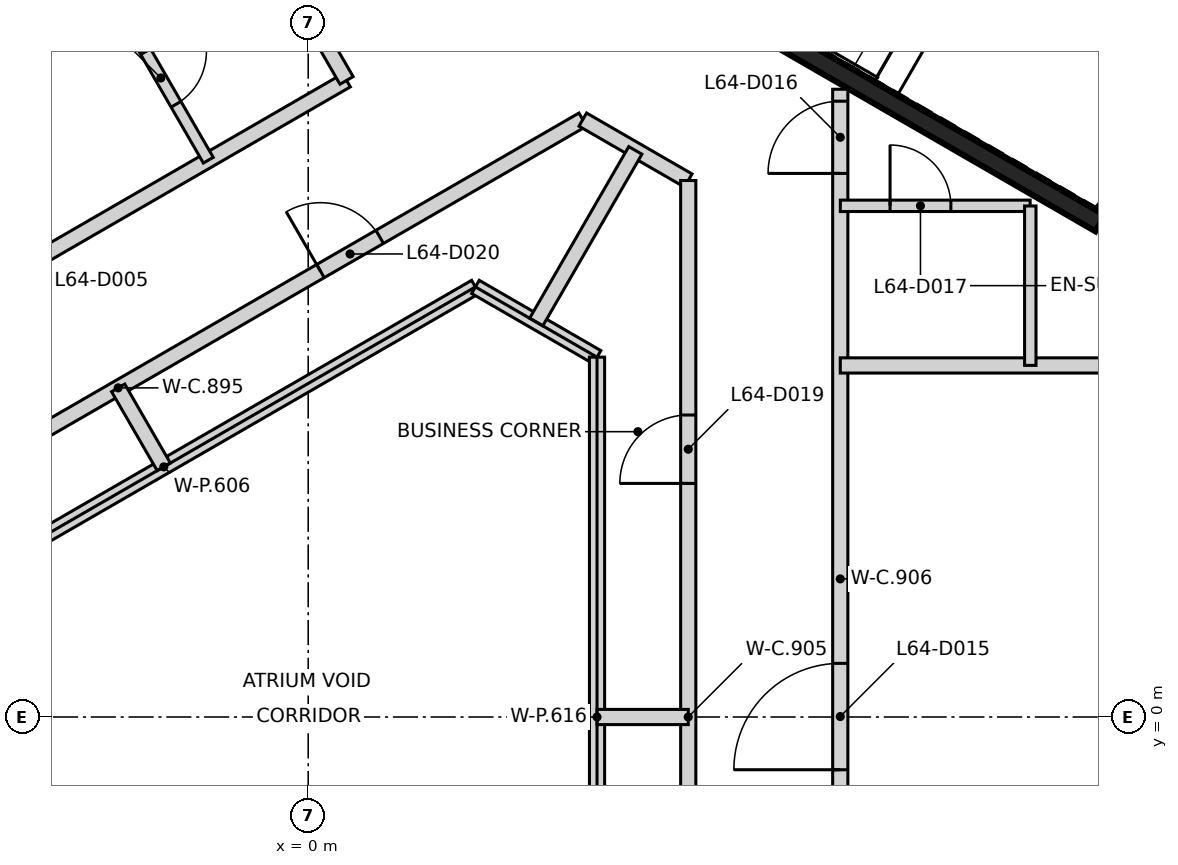
"""IFC4 building model, lengths in metres.
Left out: names, types, materials, properties, quantities, classifications, styles, units other than length and angle.
Written with IfcOpenShell. Run it as: python <this file> out.ifc"""

import sys

from ifc_helpers import new_model, si_unit, direction, frame, frame_2d, origin, place, context, subcontext, project, spatial, rectangle, extrude, element, fill, save


model = new_model("IFC4")
c1 = context("Model", 3, precision=1e-05, world=origin(), true_north=direction((0.0, 1.0)))
c2 = subcontext(c1, "Body", "Model", "MODEL_VIEW")
j1 = project(units=[si_unit("LENGTHUNIT", "METRE"), si_unit("PLANEANGLEUNIT", "RADIAN")], contexts=[c1])
p1 = place(None, origin())
s1 = spatial("IfcSite", under=j1, at=p1, CompositionType="ELEMENT")
p2 = place(p1, origin())
s2 = spatial("IfcBuilding", under=s1, at=p2, CompositionType="ELEMENT")
p3 = place(p2, frame((0.0, 0.0, 253.8)))
s3 = spatial("IfcBuildingStorey", under=s2, at=p3, CompositionType="ELEMENT", Elevation=253.8)
p4 = place(p3, frame((10.42, 6.498, 0.0), z_axis=(0.0, 0.0, 1.0), x_axis=(-0.866021906294, 0.500006057782, 0.0)))
e1 = element("IfcWall", 1, at=p4, inside=s3, PredefinedType="SHEAR", context=c2, shape_type="SweptSolid", body=[
    extrude(rectangle(XDim=11.55, YDim=0.25, at=frame_2d((5.775, 0.0))), origin(), (0.0, 0.0, 1.0), 3.2),
])
p5 = place(p4, frame((10.025, 0.0, 0.0)))
e2 = element("IfcOpeningElement", 2, at=p5, cuts=e1, PredefinedType="OPENING", context=c2, shape_type="SweptSolid", body=[
    extrude(rectangle(XDim=1.2, YDim=2.1, at=frame_2d((0.6, 1.05))), frame((0.0, 0.135, 0.0), z_axis=(0.0, -1.0, 0.0), x_axis=(1.0, 0.0, 0.0)), (0.0, 0.0, 1.0), 0.27),
])
p6 = place(p4, frame((8.725, 0.0, 0.0)))
e3 = element("IfcOpeningElement", 3, at=p6, cuts=e1, PredefinedType="OPENING", context=c2, shape_type="SweptSolid", body=[
    extrude(rectangle(XDim=1.2, YDim=2.1, at=frame_2d((0.6, 1.05))), frame((0.0, 0.135, 0.0), z_axis=(0.0, -1.0, 0.0), x_axis=(1.0, 0.0, 0.0)), (0.0, 0.0, 1.0), 0.27),
])
p7 = place(p3, frame((13.238, 11.378, 0.0), z_axis=(0.0, 0.0, 1.0), x_axis=(-0.500008851346, -0.866020293397, 0.0)))
e4 = element("IfcWall", 4, at=p7, inside=s3, PredefinedType="SHEAR", context=c2, shape_type="SweptSolid", body=[
    extrude(rectangle(XDim=5.51, YDim=0.25, at=frame_2d((2.755, 0.0))), origin(), (0.0, 0.0, 1.0), 3.2),
])
p8 = place(p3, frame((-10.652, 1.928, 0.0), z_axis=(0.0, 0.0, 1.0), x_axis=(0.865793573301, 0.500401327367, 0.0)))
e5 = element("IfcWall", 5, at=p8, inside=s3, PredefinedType="PARTITIONING", context=c2, shape_type="SweptSolid", body=[
    extrude(rectangle(XDim=12.886, YDim=0.2, at=frame_2d((6.443, 0.0))), origin(), (0.0, 0.0, 1.0), 3.2),
])
p9 = place(p8, frame((7.123, 0.0, 0.0)))
e6 = element("IfcOpeningElement", 6, at=p9, cuts=e5, PredefinedType="OPENING", context=c2, shape_type="SweptSolid", body=[
    extrude(rectangle(XDim=0.95, YDim=2.1, at=frame_2d((0.475, 1.05))), frame((0.0, 0.11, 0.0), z_axis=(0.0, -1.0, 0.0), x_axis=(1.0, 0.0, 0.0)), (0.0, 0.0, 1.0), 0.22),
])
p10 = place(p8, frame((0.16, 0.0, 0.0)))
e7 = element("IfcOpeningElement", 7, at=p10, cuts=e5, PredefinedType="OPENING", context=c2, shape_type="SweptSolid", body=[
    extrude(rectangle(XDim=0.95, YDim=2.1, at=frame_2d((0.475, 1.05))), frame((0.0, 0.11, 0.0), z_axis=(0.0, -1.0, 0.0), x_axis=(1.0, 0.0, 0.0)), (0.0, 0.0, 1.0), 0.22),
])
p11 = place(p3, frame((-8.612, -0.801, 0.0), z_axis=(0.0, 0.0, 1.0), x_axis=(0.865998070783, -0.50004733916, 0.0)))
e8 = element("IfcWall", 8, at=p11, inside=s3, PredefinedType="PARTITIONING", context=c2, shape_type="SweptSolid", body=[
    extrude(rectangle(XDim=14.115, YDim=0.2, at=frame_2d((7.058, 0.0))), origin(), (0.0, 0.0, 1.0), 3.2),
])
p12 = place(p11, frame((3.085, 0.0, 0.0)))
e9 = element("IfcOpeningElement", 9, at=p12, cuts=e8, PredefinedType="OPENING", context=c2, shape_type="SweptSolid", body=[
    extrude(rectangle(XDim=0.9, YDim=2.1, at=frame_2d((0.45, 1.05))), frame((0.0, 0.11, 0.0), z_axis=(0.0, -1.0, 0.0), x_axis=(1.0, 0.0, 0.0)), (0.0, 0.0, 1.0), 0.22),
])
p13 = place(p11, frame((10.131, 0.0, 0.0)))
e10 = element("IfcOpeningElement", 10, at=p13, cuts=e8, PredefinedType="OPENING", context=c2, shape_type="SweptSolid", body=[
    extrude(rectangle(XDim=0.9, YDim=2.1, at=frame_2d((0.45, 1.05))), frame((0.0, 0.11, 0.0), z_axis=(0.0, -1.0, 0.0), x_axis=(1.0, 0.0, 0.0)), (0.0, 0.0, 1.0), 0.22),
])
p14 = place(p3, frame((-8.612, 0.801, 0.0), z_axis=(0.0, 0.0, 1.0), x_axis=(0.866005560651, 0.500034367741, 0.0)))
e11 = element("IfcWall", 11, at=p14, inside=s3, PredefinedType="PARTITIONING", context=c2, shape_type="SweptSolid", body=[
    extrude(rectangle(XDim=14.115, YDim=0.2, at=frame_2d((7.058, 0.0))), origin(), (0.0, 0.0, 1.0), 3.2),
])
p15 = place(p14, frame((10.131, 0.0, 0.0)))
e12 = element("IfcOpeningElement", 12, at=p15, cuts=e11, PredefinedType="OPENING", context=c2, shape_type="SweptSolid", body=[
    extrude(rectangle(XDim=0.9, YDim=2.1, at=frame_2d((0.45, 1.05))), frame((0.0, 0.11, 0.0), z_axis=(0.0, -1.0, 0.0), x_axis=(1.0, 0.0, 0.0)), (0.0, 0.0, 1.0), 0.22),
])
p16 = place(p14, frame((3.085, 0.0, 0.0)))
e13 = element("IfcOpeningElement", 13, at=p16, cuts=e11, PredefinedType="OPENING", context=c2, shape_type="SweptSolid", body=[
    extrude(rectangle(XDim=0.9, YDim=2.1, at=frame_2d((0.45, 1.05))), frame((0.0, 0.11, 0.0), z_axis=(0.0, -1.0, 0.0), x_axis=(1.0, 0.0, 0.0)), (0.0, 0.0, 1.0), 0.22),
])
p17 = place(p3, frame((-2.483, 13.551, 0.0), z_axis=(0.0, 0.0, 1.0), x_axis=(0.499878046143, -0.866095802429, 0.0)))
e14 = element("IfcWall", 14, at=p17, inside=s3, PredefinedType="PARTITIONING", context=c2, shape_type="SweptSolid", body=[
    extrude(rectangle(XDim=5.977, YDim=0.2, at=frame_2d((2.988, 0.0))), origin(), (0.0, 0.0, 1.0), 3.2),
])
p18 = place(p17, frame((2.327, 0.0, 0.0)))
e15 = element("IfcOpeningElement", 15, at=p18, cuts=e14, PredefinedType="OPENING", context=c2, shape_type="SweptSolid", body=[
    extrude(rectangle(XDim=0.95, YDim=2.1, at=frame_2d((0.475, 1.05))), frame((0.0, 0.11, 0.0), z_axis=(0.0, -1.0, 0.0), x_axis=(1.0, 0.0, 0.0)), (0.0, 0.0, 1.0), 0.22),
])
p19 = place(p3, frame((3.612, 7.859, 0.0), z_axis=(0.0, 0.0, 1.0), x_axis=(0.866002901518, -0.500038973044, 0.0)))
e16 = element("IfcWall", 16, at=p19, inside=s3, PredefinedType="PARTITIONING", context=c2, shape_type="SweptSolid", body=[
    extrude(rectangle(XDim=1.602, YDim=0.2, at=frame_2d((0.801, 0.0))), origin(), (0.0, 0.0, 1.0), 3.2),
])
p20 = place(p3, frame((5.0, -7.058, 0.0), z_axis=(0.0, 0.0, 1.0), x_axis=(0.0, 1.0, 0.0)))
e17 = element("IfcWall", 17, at=p20, inside=s3, PredefinedType="PARTITIONING", context=c2, shape_type="SweptSolid", body=[
    extrude(rectangle(XDim=14.116, YDim=0.2, at=frame_2d((7.058, 0.0))), origin(), (0.0, 0.0, 1.0), 3.2),
])
p21 = place(p20, frame((3.085, 0.0, 0.0)))
e18 = element("IfcOpeningElement", 18, at=p21, cuts=e17, PredefinedType="OPENING", context=c2, shape_type="SweptSolid", body=[
    extrude(rectangle(XDim=0.9, YDim=2.1, at=frame_2d((0.45, 1.05))), frame((0.0, 0.11, 0.0), z_axis=(0.0, -1.0, 0.0), x_axis=(1.0, 0.0, 0.0)), (0.0, 0.0, 1.0), 0.22),
])
p22 = place(p20, frame((10.131, 0.0, 0.0)))
e19 = element("IfcOpeningElement", 19, at=p22, cuts=e17, PredefinedType="OPENING", context=c2, shape_type="SweptSolid", body=[
    extrude(rectangle(XDim=0.9, YDim=2.1, at=frame_2d((0.45, 1.05))), frame((0.0, 0.11, 0.0), z_axis=(0.0, -1.0, 0.0), x_axis=(1.0, 0.0, 0.0)), (0.0, 0.0, 1.0), 0.22),
])
p23 = place(p3, frame((7.0, -4.625, 0.0), z_axis=(0.0, 0.0, 1.0), x_axis=(0.0, 1.0, 0.0)))
e20 = element("IfcWall", 20, at=p23, inside=s3, PredefinedType="PARTITIONING", context=c2, shape_type="SweptSolid", body=[
    extrude(rectangle(XDim=12.884, YDim=0.2, at=frame_2d((6.442, 0.0))), origin(), (0.0, 0.0, 1.0), 3.2),
])
p24 = place(p23, frame((3.931, 0.0, 0.0)))
e21 = element("IfcOpeningElement", 21, at=p24, cuts=e20, PredefinedType="OPENING", context=c2, shape_type="SweptSolid", body=[
    extrude(rectangle(XDim=1.4, YDim=2.1, at=frame_2d((0.7, 1.05))), frame((0.0, 0.11, 0.0), z_axis=(0.0, -1.0, 0.0), x_axis=(1.0, 0.0, 0.0)), (0.0, 0.0, 1.0), 0.22),
])
p25 = place(p23, frame((11.777, 0.0, 0.0)))
e22 = element("IfcOpeningElement", 22, at=p25, cuts=e20, PredefinedType="OPENING", context=c2, shape_type="SweptSolid", body=[
    extrude(rectangle(XDim=0.95, YDim=2.1, at=frame_2d((0.475, 1.05))), frame((0.0, 0.11, 0.0), z_axis=(0.0, -1.0, 0.0), x_axis=(1.0, 0.0, 0.0)), (0.0, 0.0, 1.0), 0.22),
])
for number, where, z_axis, x_axis in (
    (23, (-6.0, -0.924, 0.0), (0.0, 0.0, 1.0), (0.866, -0.5, 0.0)),
    (24, (-6.0, 0.924, 0.0), (0.0, 0.0, 1.0), (0.866, 0.5, 0.0)),
):
    element("IfcWall", number, at=place(p3, frame(where, z_axis=z_axis, x_axis=x_axis)), inside=s3, PredefinedType="PARTITIONING", context=c2, shape_type="SweptSolid", body=[
        extrude(rectangle(XDim=9.468, YDim=0.2, at=frame_2d((4.734, 0.0))), origin(), (0.0, 0.0, 1.0), 3.2),
    ])
p26 = place(p3, frame((-2.5, 4.33, 0.0), z_axis=(0.0, 0.0, 1.0), x_axis=(0.499969057507, -0.866043267704, 0.0)))
e25 = element("IfcWall", 25, at=p26, inside=s3, PredefinedType="PARTITIONING", context=c2, shape_type="SweptSolid", body=[
    extrude(rectangle(XDim=1.2, YDim=0.2, at=frame_2d((0.6, 0.0))), origin(), (0.0, 0.0, 1.0), 3.2),
])
p27 = place(p3, frame((2.2, 5.658, 0.0), z_axis=(0.0, 0.0, 1.0), x_axis=(0.865818011038, -0.500359042851, 0.0)))
e26 = element("IfcWall", 26, at=p27, inside=s3, PredefinedType="PARTITIONING", context=c2, shape_type="SweptSolid", body=[
    extrude(rectangle(XDim=1.848, YDim=0.2, at=frame_2d((0.924, 0.0))), origin(), (0.0, 0.0, 1.0), 3.2),
])
p28 = place(p3, frame((3.0, 5.196, 0.0), z_axis=(0.0, 0.0, 1.0), x_axis=(0.500076354988, 0.865981315724, 0.0)))
e27 = element("IfcWall", 27, at=p28, inside=s3, PredefinedType="PARTITIONING", context=c2, shape_type="SweptSolid", body=[
    extrude(rectangle(XDim=2.607, YDim=0.2, at=frame_2d((1.304, 0.0))), origin(), (0.0, 0.0, 1.0), 3.2),
])
p29 = place(p3, frame((3.8, -4.734, 0.0), z_axis=(0.0, 0.0, 1.0), x_axis=(0.0, 1.0, 0.0)))
e28 = element("IfcWall", 28, at=p29, inside=s3, PredefinedType="PARTITIONING", context=c2, shape_type="SweptSolid", body=[
    extrude(rectangle(XDim=9.468, YDim=0.2, at=frame_2d((4.734, 0.0))), origin(), (0.0, 0.0, 1.0), 3.2),
])
p30 = place(p3, frame((3.8, 0.0, 0.0), z_axis=(0.0, 0.0, 1.0), x_axis=(1.0, 0.0, 0.0)))
e29 = element("IfcWall", 29, at=p30, inside=s3, PredefinedType="PARTITIONING", context=c2, shape_type="SweptSolid", body=[
    extrude(rectangle(XDim=1.2, YDim=0.2, at=frame_2d((0.6, 0.0))), origin(), (0.0, 0.0, 1.0), 3.2),
])
p31 = place(p3, frame((7.0, 4.625, 0.0), z_axis=(0.0, 0.0, 1.0), x_axis=(1.0, 0.0, 0.0)))
e30 = element("IfcWall", 30, at=p31, inside=s3, PredefinedType="PARTITIONING", context=c2, shape_type="SweptSolid", body=[
    extrude(rectangle(XDim=11.204, YDim=0.2, at=frame_2d((5.602, 0.0))), origin(), (0.0, 0.0, 1.0), 3.2),
])
p32 = place(p3, frame((-2.564, 9.49, 0.0), z_axis=(0.0, 0.0, 1.0), x_axis=(0.500004234368, -0.866022959057, 0.0)))
e31 = element("IfcWall", 31, at=p32, inside=s3, PredefinedType="PARTITIONING", context=c2, shape_type="SweptSolid", body=[
    extrude(rectangle(XDim=2.5, YDim=0.15, at=frame_2d((1.25, 0.0))), origin(), (0.0, 0.0, 1.0), 3.2),
])
p33 = place(p32, frame((0.85, 0.0, 0.0)))
e32 = element("IfcOpeningElement", 32, at=p33, cuts=e31, PredefinedType="OPENING", context=c2, shape_type="SweptSolid", body=[
    extrude(rectangle(XDim=0.8, YDim=2.1, at=frame_2d((0.4, 1.05))), frame((0.0, 0.085, 0.0), z_axis=(0.0, -1.0, 0.0), x_axis=(1.0, 0.0, 0.0)), (0.0, 0.0, 1.0), 0.17),
])
p34 = place(p3, frame((7.001, 6.725, 0.0), z_axis=(0.0, 0.0, 1.0), x_axis=(1.0, 0.0, 0.0)))
e33 = element("IfcWall", 33, at=p34, inside=s3, PredefinedType="PARTITIONING", context=c2, shape_type="SweptSolid", body=[
    extrude(rectangle(XDim=2.497, YDim=0.15, at=frame_2d((1.249, 0.0))), origin(), (0.0, 0.0, 1.0), 3.2),
])
p35 = place(p34, frame((0.654, 0.0, 0.0)))
e34 = element("IfcOpeningElement", 34, at=p35, cuts=e33, PredefinedType="OPENING", context=c2, shape_type="SweptSolid", body=[
    extrude(rectangle(XDim=0.8, YDim=2.1, at=frame_2d((0.4, 1.05))), frame((0.0, 0.085, 0.0), z_axis=(0.0, -1.0, 0.0), x_axis=(1.0, 0.0, 0.0)), (0.0, 0.0, 1.0), 0.17),
])
p36 = place(p3, frame((9.5, 4.626, 0.0), z_axis=(0.0, 0.0, 1.0), x_axis=(0.0, 1.0, 0.0)))
e35 = element("IfcWall", 35, at=p36, inside=s3, PredefinedType="PARTITIONING", context=c2, shape_type="SweptSolid", body=[
    extrude(rectangle(XDim=2.097, YDim=0.15, at=frame_2d((1.048, 0.0))), origin(), (0.0, 0.0, 1.0), 3.2),
])
p37 = place(p33, frame((0.8, 0.0, 0.0), z_axis=(0.0, 0.0, 1.0), x_axis=(-1.0, 0.0, 0.0)))
e36 = element("IfcDoor", 36, at=p37, inside=s3, OperationType="SINGLE_SWING_LEFT", PredefinedType="DOOR", context=c2, shape_type="SweptSolid", body=[
    extrude(rectangle(XDim=0.8, YDim=2.1, at=frame_2d((0.4, 1.05))), frame((0.0, 0.025, 0.0), z_axis=(0.0, -1.0, 0.0), x_axis=(1.0, 0.0, 0.0)), (0.0, 0.0, 1.0), 0.05),
])
fill(e32, e36)
p38 = place(p24, frame((1.4, 0.0, 0.0), z_axis=(0.0, 0.0, 1.0), x_axis=(-1.0, 0.0, 0.0)))
e37 = element("IfcDoor", 37, at=p38, inside=s3, OperationType="DOUBLE_DOOR_SINGLE_SWING", PredefinedType="DOOR", context=c2, shape_type="SweptSolid", body=[
    extrude(rectangle(XDim=1.4, YDim=2.1, at=frame_2d((0.7, 1.05))), frame((0.0, 0.025, 0.0), z_axis=(0.0, -1.0, 0.0), x_axis=(1.0, 0.0, 0.0)), (0.0, 0.0, 1.0), 0.05),
])
fill(e21, e37)
p39 = place(p25, frame((0.95, 0.0, 0.0), z_axis=(0.0, 0.0, 1.0), x_axis=(-1.0, 0.0, 0.0)))
e38 = element("IfcDoor", 38, at=p39, inside=s3, OperationType="SINGLE_SWING_LEFT", PredefinedType="DOOR", context=c2, shape_type="SweptSolid", body=[
    extrude(rectangle(XDim=0.95, YDim=2.1, at=frame_2d((0.475, 1.05))), frame((0.0, 0.025, 0.0), z_axis=(0.0, -1.0, 0.0), x_axis=(1.0, 0.0, 0.0)), (0.0, 0.0, 1.0), 0.05),
])
fill(e22, e38)
p40 = place(p35, origin())
e39 = element("IfcDoor", 39, at=p40, inside=s3, OperationType="SINGLE_SWING_LEFT", PredefinedType="DOOR", context=c2, shape_type="SweptSolid", body=[
    extrude(rectangle(XDim=0.8, YDim=2.1, at=frame_2d((0.4, 1.05))), frame((0.0, 0.025, 0.0), z_axis=(0.0, -1.0, 0.0), x_axis=(1.0, 0.0, 0.0)), (0.0, 0.0, 1.0), 0.05),
])
fill(e34, e39)
p41 = place(p22, origin())
e40 = element("IfcDoor", 40, at=p41, inside=s3, OperationType="SINGLE_SWING_LEFT", PredefinedType="DOOR", context=c2, shape_type="SweptSolid", body=[
    extrude(rectangle(XDim=0.9, YDim=2.1, at=frame_2d((0.45, 1.05))), frame((0.0, 0.025, 0.0), z_axis=(0.0, -1.0, 0.0), x_axis=(1.0, 0.0, 0.0)), (0.0, 0.0, 1.0), 0.05),
])
fill(e19, e40)
p42 = place(p15, frame((0.9, 0.0, 0.0), z_axis=(0.0, 0.0, 1.0), x_axis=(-1.0, 0.0, 0.0)))
e41 = element("IfcDoor", 41, at=p42, inside=s3, OperationType="SINGLE_SWING_LEFT", PredefinedType="DOOR", context=c2, shape_type="SweptSolid", body=[
    extrude(rectangle(XDim=0.9, YDim=2.1, at=frame_2d((0.45, 1.05))), frame((0.0, 0.025, 0.0), z_axis=(0.0, -1.0, 0.0), x_axis=(1.0, 0.0, 0.0)), (0.0, 0.0, 1.0), 0.05),
])
fill(e12, e41)
save(model, sys.argv[1])
